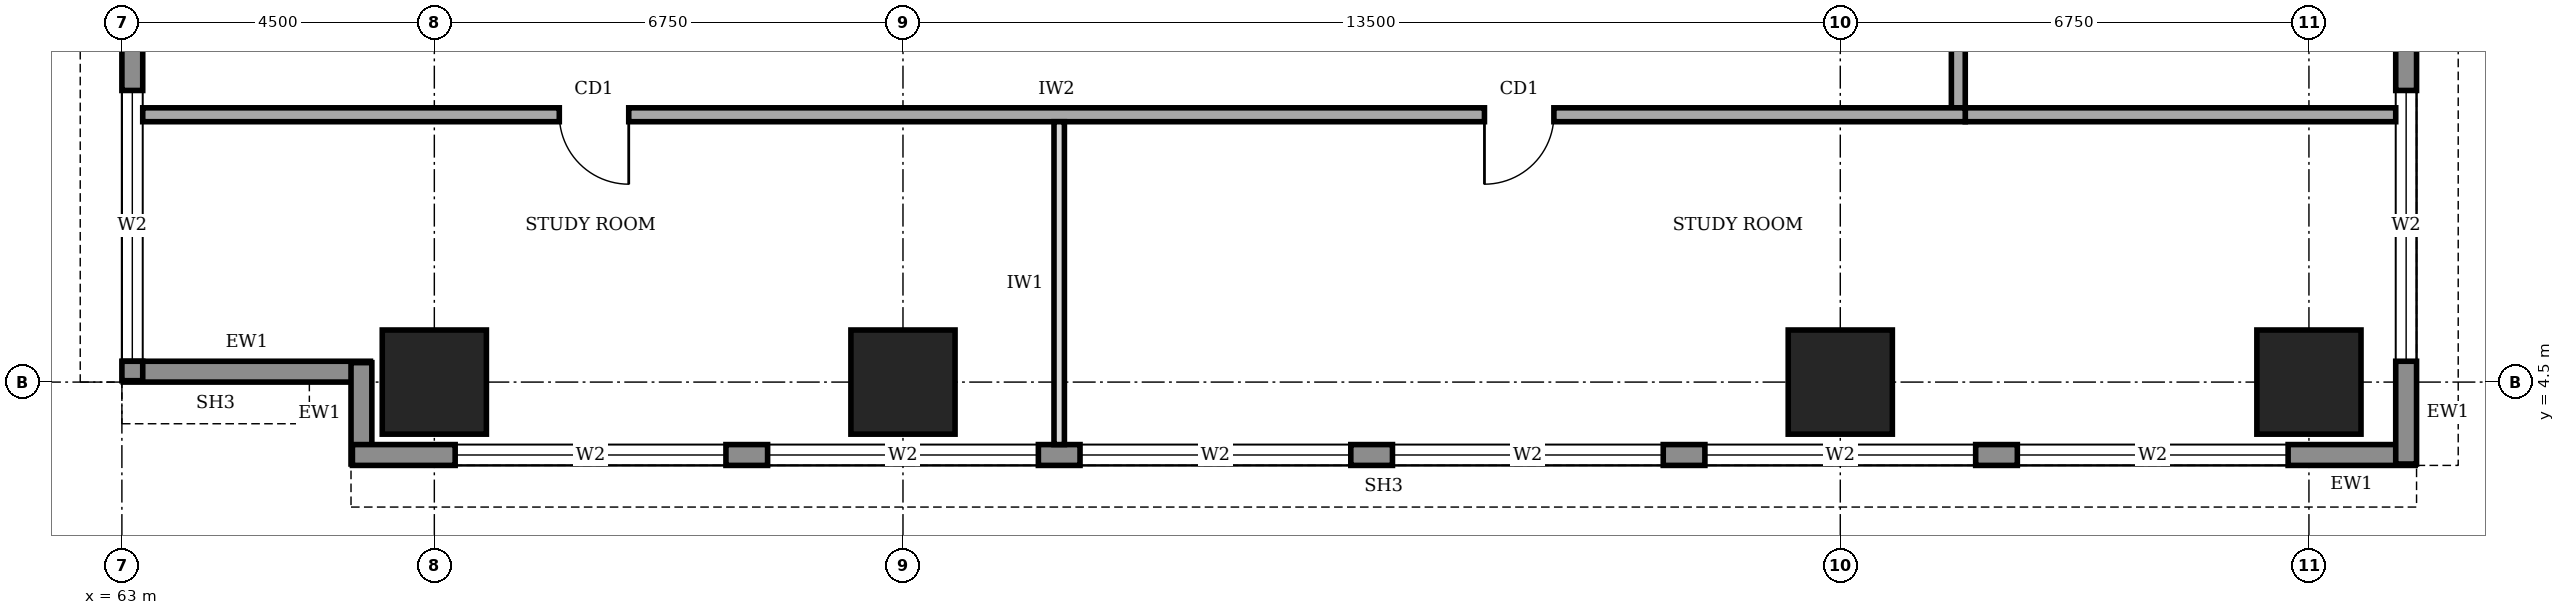
"""IFC4 building model, lengths in metres.
Left out: names, types, materials, properties, quantities, classifications, styles, units other than length and angle.
Written with IfcOpenShell. Run it as: python <this file> out.ifc"""

import sys

from ifc_helpers import new_model, si_unit, direction, frame, frame_2d, origin, origin_2d, place, context, subcontext, project, spatial, rectangle, extrude, element, fill, save


model = new_model("IFC4")
c1 = context("Model", 3, precision=1e-05, world=origin(), true_north=direction((0.0, 1.0)))
c2 = subcontext(c1, "Body", "Model", "MODEL_VIEW")
j1 = project(units=[si_unit("LENGTHUNIT", "METRE"), si_unit("PLANEANGLEUNIT", "RADIAN")], contexts=[c1])
p1 = place(None, origin())
s1 = spatial("IfcSite", under=j1, at=p1, CompositionType="ELEMENT")
p2 = place(p1, origin())
s2 = spatial("IfcBuilding", under=s1, at=p2, CompositionType="ELEMENT")
p3 = place(p2, frame((0.0, 0.0, 157.0)))
s3 = spatial("IfcBuildingStorey", under=s2, at=p3, CompositionType="ELEMENT", Elevation=157.0)
for number, where, z_axis, x_axis in (
    (1, (67.5, 4.5, 0.0), (0.0, 0.0, 1.0), (1.0, 0.0, 0.0)),
    (2, (74.25, 4.5, 0.0), (0.0, 0.0, 1.0), (1.0, 0.0, 0.0)),
    (3, (87.75, 4.5, 0.0), (0.0, 0.0, 1.0), (1.0, 0.0, 0.0)),
    (4, (94.5, 4.5, 0.0), (0.0, 0.0, 1.0), (1.0, 0.0, 0.0)),
):
    element("IfcColumn", number, at=place(p3, frame(where, z_axis=z_axis, x_axis=x_axis)), inside=s3, PredefinedType="COLUMN", context=c2, shape_type="SweptSolid", body=[
        extrude(rectangle(XDim=1.5, YDim=1.5, at=origin_2d()), origin(), (0.0, 0.0, 1.0), 4.0),
    ])
p4 = place(p3, frame((63.02, 4.65, 0.0), z_axis=(0.0, 0.0, 1.0), x_axis=(1.0, 0.0, 0.0)))
e5 = element("IfcWall", 5, at=p4, inside=s3, PredefinedType="STANDARD", context=c2, shape_type="SweptSolid", body=[
    extrude(rectangle(XDim=3.56, YDim=0.3, at=frame_2d((1.78, 0.0))), origin(), (0.0, 0.0, 1.0), 2.85),
])
p5 = place(p3, frame((66.45, 4.78, 0.0), z_axis=(0.0, 0.0, 1.0), x_axis=(0.0, -1.0, 0.0)))
e6 = element("IfcWall", 6, at=p5, inside=s3, PredefinedType="STANDARD", context=c2, shape_type="SweptSolid", body=[
    extrude(rectangle(XDim=1.46, YDim=0.3, at=frame_2d((0.73, 0.0))), origin(), (0.0, 0.0, 1.0), 3.75),
])
p6 = place(p3, frame((66.32, 3.45, 0.0), z_axis=(0.0, 0.0, 1.0), x_axis=(1.0, 0.0, 0.0)))
e7 = element("IfcWall", 7, at=p6, inside=s3, PredefinedType="STANDARD", context=c2, shape_type="SweptSolid", body=[
    extrude(rectangle(XDim=29.71, YDim=0.3, at=frame_2d((14.855, 0.0))), origin(), (0.0, 0.0, 1.0), 3.75),
])
p7 = place(p6, frame((1.48, 0.0, 0.6)))
e8 = element("IfcOpeningElement", 8, at=p7, cuts=e7, PredefinedType="OPENING", context=c2, shape_type="SweptSolid", body=[
    extrude(rectangle(XDim=3.9, YDim=2.6, at=frame_2d((1.95, 1.3))), frame((0.0, 0.16, 0.0), z_axis=(0.0, -1.0, 0.0), x_axis=(1.0, 0.0, 0.0)), (0.0, 0.0, 1.0), 0.32),
])
p8 = place(p6, frame((5.98, 0.0, 0.6)))
e9 = element("IfcOpeningElement", 9, at=p8, cuts=e7, PredefinedType="OPENING", context=c2, shape_type="SweptSolid", body=[
    extrude(rectangle(XDim=3.9, YDim=2.6, at=frame_2d((1.95, 1.3))), frame((0.0, 0.16, 0.0), z_axis=(0.0, -1.0, 0.0), x_axis=(1.0, 0.0, 0.0)), (0.0, 0.0, 1.0), 0.32),
])
p9 = place(p6, frame((10.48, 0.0, 0.6)))
e10 = element("IfcOpeningElement", 10, at=p9, cuts=e7, PredefinedType="OPENING", context=c2, shape_type="SweptSolid", body=[
    extrude(rectangle(XDim=3.9, YDim=2.6, at=frame_2d((1.95, 1.3))), frame((0.0, 0.16, 0.0), z_axis=(0.0, -1.0, 0.0), x_axis=(1.0, 0.0, 0.0)), (0.0, 0.0, 1.0), 0.32),
])
p10 = place(p6, frame((14.98, 0.0, 0.6)))
e11 = element("IfcOpeningElement", 11, at=p10, cuts=e7, PredefinedType="OPENING", context=c2, shape_type="SweptSolid", body=[
    extrude(rectangle(XDim=3.9, YDim=2.6, at=frame_2d((1.95, 1.3))), frame((0.0, 0.16, 0.0), z_axis=(0.0, -1.0, 0.0), x_axis=(1.0, 0.0, 0.0)), (0.0, 0.0, 1.0), 0.32),
])
p11 = place(p6, frame((19.48, 0.0, 0.6)))
e12 = element("IfcOpeningElement", 12, at=p11, cuts=e7, PredefinedType="OPENING", context=c2, shape_type="SweptSolid", body=[
    extrude(rectangle(XDim=3.9, YDim=2.6, at=frame_2d((1.95, 1.3))), frame((0.0, 0.16, 0.0), z_axis=(0.0, -1.0, 0.0), x_axis=(1.0, 0.0, 0.0)), (0.0, 0.0, 1.0), 0.32),
])
p12 = place(p6, frame((23.98, 0.0, 0.6)))
e13 = element("IfcOpeningElement", 13, at=p12, cuts=e7, PredefinedType="OPENING", context=c2, shape_type="SweptSolid", body=[
    extrude(rectangle(XDim=3.9, YDim=2.6, at=frame_2d((1.95, 1.3))), frame((0.0, 0.16, 0.0), z_axis=(0.0, -1.0, 0.0), x_axis=(1.0, 0.0, 0.0)), (0.0, 0.0, 1.0), 0.32),
])
p13 = place(p3, frame((95.9, 3.32, 0.0), z_axis=(0.0, 0.0, 1.0), x_axis=(0.0, 1.0, 0.0)))
e14 = element("IfcWall", 14, at=p13, inside=s3, PredefinedType="STANDARD", context=c2, shape_type="SweptSolid", body=[
    extrude(rectangle(XDim=33.86, YDim=0.3, at=frame_2d((16.93, 0.0))), origin(), (0.0, 0.0, 1.0), 3.75),
])
p14 = place(p13, frame((1.48, 0.0, 0.6)))
e15 = element("IfcOpeningElement", 15, at=p14, cuts=e14, PredefinedType="OPENING", context=c2, shape_type="SweptSolid", body=[
    extrude(rectangle(XDim=3.9, YDim=2.6, at=frame_2d((1.95, 1.3))), frame((0.0, 0.16, 0.0), z_axis=(0.0, -1.0, 0.0), x_axis=(1.0, 0.0, 0.0)), (0.0, 0.0, 1.0), 0.32),
])
p15 = place(p13, frame((5.98, 0.0, 0.6)))
e16 = element("IfcOpeningElement", 16, at=p15, cuts=e14, PredefinedType="OPENING", context=c2, shape_type="SweptSolid", body=[
    extrude(rectangle(XDim=3.9, YDim=2.6, at=frame_2d((1.95, 1.3))), frame((0.0, 0.16, 0.0), z_axis=(0.0, -1.0, 0.0), x_axis=(1.0, 0.0, 0.0)), (0.0, 0.0, 1.0), 0.32),
])
p16 = place(p13, frame((10.48, 0.0, 0.6)))
e17 = element("IfcOpeningElement", 17, at=p16, cuts=e14, PredefinedType="OPENING", context=c2, shape_type="SweptSolid", body=[
    extrude(rectangle(XDim=3.9, YDim=2.6, at=frame_2d((1.95, 1.3))), frame((0.0, 0.16, 0.0), z_axis=(0.0, -1.0, 0.0), x_axis=(1.0, 0.0, 0.0)), (0.0, 0.0, 1.0), 0.32),
])
p17 = place(p13, frame((14.98, 0.0, 0.6)))
e18 = element("IfcOpeningElement", 18, at=p17, cuts=e14, PredefinedType="OPENING", context=c2, shape_type="SweptSolid", body=[
    extrude(rectangle(XDim=3.9, YDim=2.6, at=frame_2d((1.95, 1.3))), frame((0.0, 0.16, 0.0), z_axis=(0.0, -1.0, 0.0), x_axis=(1.0, 0.0, 0.0)), (0.0, 0.0, 1.0), 0.32),
])
p18 = place(p13, frame((19.48, 0.0, 0.6)))
e19 = element("IfcOpeningElement", 19, at=p18, cuts=e14, PredefinedType="OPENING", context=c2, shape_type="SweptSolid", body=[
    extrude(rectangle(XDim=3.9, YDim=2.6, at=frame_2d((1.95, 1.3))), frame((0.0, 0.16, 0.0), z_axis=(0.0, -1.0, 0.0), x_axis=(1.0, 0.0, 0.0)), (0.0, 0.0, 1.0), 0.32),
])
p19 = place(p13, frame((23.98, 0.0, 0.6)))
e20 = element("IfcOpeningElement", 20, at=p19, cuts=e14, PredefinedType="OPENING", context=c2, shape_type="SweptSolid", body=[
    extrude(rectangle(XDim=3.9, YDim=2.6, at=frame_2d((1.95, 1.3))), frame((0.0, 0.16, 0.0), z_axis=(0.0, -1.0, 0.0), x_axis=(1.0, 0.0, 0.0)), (0.0, 0.0, 1.0), 0.32),
])
p20 = place(p13, frame((28.48, 0.0, 0.6)))
e21 = element("IfcOpeningElement", 21, at=p20, cuts=e14, PredefinedType="OPENING", context=c2, shape_type="SweptSolid", body=[
    extrude(rectangle(XDim=3.9, YDim=2.6, at=frame_2d((1.95, 1.3))), frame((0.0, 0.16, 0.0), z_axis=(0.0, -1.0, 0.0), x_axis=(1.0, 0.0, 0.0)), (0.0, 0.0, 1.0), 0.32),
])
p21 = place(p3, frame((63.15, 35.98, 0.0), z_axis=(0.0, 0.0, 1.0), x_axis=(0.0, -1.0, 0.0)))
e22 = element("IfcWall", 22, at=p21, inside=s3, PredefinedType="STANDARD", context=c2, shape_type="SweptSolid", body=[
    extrude(rectangle(XDim=31.46, YDim=0.3, at=frame_2d((15.73, 0.0))), origin(), (0.0, 0.0, 1.0), 3.75),
])
p22 = place(p21, frame((27.28, 0.0, 0.6)))
e23 = element("IfcOpeningElement", 23, at=p22, cuts=e22, PredefinedType="OPENING", context=c2, shape_type="SweptSolid", body=[
    extrude(rectangle(XDim=3.9, YDim=2.6, at=frame_2d((1.95, 1.3))), frame((0.0, 0.16, 0.0), z_axis=(0.0, -1.0, 0.0), x_axis=(1.0, 0.0, 0.0)), (0.0, 0.0, 1.0), 0.32),
])
p23 = place(p21, frame((22.78, 0.0, 0.6)))
e24 = element("IfcOpeningElement", 24, at=p23, cuts=e22, PredefinedType="OPENING", context=c2, shape_type="SweptSolid", body=[
    extrude(rectangle(XDim=3.9, YDim=2.6, at=frame_2d((1.95, 1.3))), frame((0.0, 0.16, 0.0), z_axis=(0.0, -1.0, 0.0), x_axis=(1.0, 0.0, 0.0)), (0.0, 0.0, 1.0), 0.32),
])
p24 = place(p21, frame((18.28, 0.0, 0.6)))
e25 = element("IfcOpeningElement", 25, at=p24, cuts=e22, PredefinedType="OPENING", context=c2, shape_type="SweptSolid", body=[
    extrude(rectangle(XDim=3.9, YDim=2.6, at=frame_2d((1.95, 1.3))), frame((0.0, 0.16, 0.0), z_axis=(0.0, -1.0, 0.0), x_axis=(1.0, 0.0, 0.0)), (0.0, 0.0, 1.0), 0.32),
])
p25 = place(p21, frame((13.78, 0.0, 0.6)))
e26 = element("IfcOpeningElement", 26, at=p25, cuts=e22, PredefinedType="OPENING", context=c2, shape_type="SweptSolid", body=[
    extrude(rectangle(XDim=3.9, YDim=2.6, at=frame_2d((1.95, 1.3))), frame((0.0, 0.16, 0.0), z_axis=(0.0, -1.0, 0.0), x_axis=(1.0, 0.0, 0.0)), (0.0, 0.0, 1.0), 0.32),
])
p26 = place(p21, frame((9.28, 0.0, 0.6)))
e27 = element("IfcOpeningElement", 27, at=p26, cuts=e22, PredefinedType="OPENING", context=c2, shape_type="SweptSolid", body=[
    extrude(rectangle(XDim=3.9, YDim=2.6, at=frame_2d((1.95, 1.3))), frame((0.0, 0.16, 0.0), z_axis=(0.0, -1.0, 0.0), x_axis=(1.0, 0.0, 0.0)), (0.0, 0.0, 1.0), 0.32),
])
p27 = place(p21, frame((4.78, 0.0, 0.6)))
e28 = element("IfcOpeningElement", 28, at=p27, cuts=e22, PredefinedType="OPENING", context=c2, shape_type="SweptSolid", body=[
    extrude(rectangle(XDim=3.9, YDim=2.6, at=frame_2d((1.95, 1.3))), frame((0.0, 0.16, 0.0), z_axis=(0.0, -1.0, 0.0), x_axis=(1.0, 0.0, 0.0)), (0.0, 0.0, 1.0), 0.32),
])
p28 = place(p3, frame((63.3, 8.35, 0.0), z_axis=(0.0, 0.0, 1.0), x_axis=(1.0, 0.0, 0.0)))
e29 = element("IfcWall", 29, at=p28, inside=s3, PredefinedType="SOLIDWALL", context=c2, shape_type="SweptSolid", body=[
    extrude(rectangle(XDim=26.25, YDim=0.2, at=frame_2d((13.125, 0.0))), origin(), (0.0, 0.0, 1.0), 3.75),
])
p29 = place(p28, frame((6.0, 0.0, 0.0)))
e30 = element("IfcOpeningElement", 30, at=p29, cuts=e29, PredefinedType="OPENING", context=c2, shape_type="SweptSolid", body=[
    extrude(rectangle(XDim=1.0, YDim=2.1, at=frame_2d((0.5, 1.05))), frame((0.0, 0.11, 0.0), z_axis=(0.0, -1.0, 0.0), x_axis=(1.0, 0.0, 0.0)), (0.0, 0.0, 1.0), 0.22),
])
p30 = place(p28, frame((19.325, 0.0, 0.0)))
e31 = element("IfcOpeningElement", 31, at=p30, cuts=e29, PredefinedType="OPENING", context=c2, shape_type="SweptSolid", body=[
    extrude(rectangle(XDim=1.0, YDim=2.1, at=frame_2d((0.5, 1.05))), frame((0.0, 0.11, 0.0), z_axis=(0.0, -1.0, 0.0), x_axis=(1.0, 0.0, 0.0)), (0.0, 0.0, 1.0), 0.22),
])
p31 = place(p3, frame((89.45, 8.45, 0.0), z_axis=(0.0, 0.0, 1.0), x_axis=(0.0, 1.0, 0.0)))
e32 = element("IfcWall", 32, at=p31, inside=s3, PredefinedType="SOLIDWALL", context=c2, shape_type="SweptSolid", body=[
    extrude(rectangle(XDim=23.8, YDim=0.2, at=frame_2d((11.9, 0.0))), origin(), (0.0, 0.0, 1.0), 3.75),
])
p32 = place(p31, frame((1.925, 0.0, 0.0)))
e33 = element("IfcOpeningElement", 33, at=p32, cuts=e32, PredefinedType="OPENING", context=c2, shape_type="SweptSolid", body=[
    extrude(rectangle(XDim=1.0, YDim=2.1, at=frame_2d((0.5, 1.05))), frame((0.0, 0.11, 0.0), z_axis=(0.0, -1.0, 0.0), x_axis=(1.0, 0.0, 0.0)), (0.0, 0.0, 1.0), 0.22),
])
p33 = place(p31, frame((6.5, 0.0, 0.0)))
e34 = element("IfcOpeningElement", 34, at=p33, cuts=e32, PredefinedType="OPENING", context=c2, shape_type="SweptSolid", body=[
    extrude(rectangle(XDim=0.9, YDim=2.1, at=frame_2d((0.45, 1.05))), frame((0.0, 0.11, 0.0), z_axis=(0.0, -1.0, 0.0), x_axis=(1.0, 0.0, 0.0)), (0.0, 0.0, 1.0), 0.22),
])
p34 = place(p31, frame((9.5, 0.0, 0.0)))
e35 = element("IfcOpeningElement", 35, at=p34, cuts=e32, PredefinedType="OPENING", context=c2, shape_type="SweptSolid", body=[
    extrude(rectangle(XDim=0.9, YDim=2.1, at=frame_2d((0.45, 1.05))), frame((0.0, 0.11, 0.0), z_axis=(0.0, -1.0, 0.0), x_axis=(1.0, 0.0, 0.0)), (0.0, 0.0, 1.0), 0.22),
])
p35 = place(p31, frame((14.35, 0.0, 0.0)))
e36 = element("IfcOpeningElement", 36, at=p35, cuts=e32, PredefinedType="OPENING", context=c2, shape_type="SweptSolid", body=[
    extrude(rectangle(XDim=0.9, YDim=2.1, at=frame_2d((0.45, 1.05))), frame((0.0, 0.11, 0.0), z_axis=(0.0, -1.0, 0.0), x_axis=(1.0, 0.0, 0.0)), (0.0, 0.0, 1.0), 0.22),
])
p36 = place(p31, frame((17.05, 0.0, 0.0)))
e37 = element("IfcOpeningElement", 37, at=p36, cuts=e32, PredefinedType="OPENING", context=c2, shape_type="SweptSolid", body=[
    extrude(rectangle(XDim=1.0, YDim=2.1, at=frame_2d((0.5, 1.05))), frame((0.0, 0.11, 0.0), z_axis=(0.0, -1.0, 0.0), x_axis=(1.0, 0.0, 0.0)), (0.0, 0.0, 1.0), 0.22),
])
p37 = place(p31, frame((11.55, 0.0, 0.0)))
e38 = element("IfcOpeningElement", 38, at=p37, cuts=e32, PredefinedType="OPENING", context=c2, shape_type="SweptSolid", body=[
    extrude(rectangle(XDim=1.0, YDim=2.1, at=frame_2d((0.5, 1.05))), frame((0.0, 0.11, 0.0), z_axis=(0.0, -1.0, 0.0), x_axis=(1.0, 0.0, 0.0)), (0.0, 0.0, 1.0), 0.22),
])
p38 = place(p31, frame((20.675, 0.0, 0.0)))
e39 = element("IfcOpeningElement", 39, at=p38, cuts=e32, PredefinedType="OPENING", context=c2, shape_type="SweptSolid", body=[
    extrude(rectangle(XDim=1.0, YDim=2.1, at=frame_2d((0.5, 1.05))), frame((0.0, 0.11, 0.0), z_axis=(0.0, -1.0, 0.0), x_axis=(1.0, 0.0, 0.0)), (0.0, 0.0, 1.0), 0.22),
])
p39 = place(p3, frame((89.55, 8.35, 0.0), z_axis=(0.0, 0.0, 1.0), x_axis=(1.0, 0.0, 0.0)))
e40 = element("IfcWall", 40, at=p39, inside=s3, PredefinedType="SOLIDWALL", context=c2, shape_type="SweptSolid", body=[
    extrude(rectangle(XDim=6.2, YDim=0.2, at=frame_2d((3.1, 0.0))), origin(), (0.0, 0.0, 1.0), 3.75),
])
p40 = place(p3, frame((76.5, 3.6, 0.0), z_axis=(0.0, 0.0, 1.0), x_axis=(0.0, 1.0, 0.0)))
e41 = element("IfcWall", 41, at=p40, inside=s3, PredefinedType="PARTITIONING", context=c2, shape_type="SweptSolid", body=[
    extrude(rectangle(XDim=4.65, YDim=0.15, at=frame_2d((2.325, 0.0))), origin(), (0.0, 0.0, 1.0), 3.75),
])
p41 = place(p7, origin())
e42 = element("IfcWindow", 42, at=p41, inside=s3, PartitioningType="SINGLE_PANEL", PredefinedType="WINDOW", context=c2, shape_type="SweptSolid", body=[
    extrude(rectangle(XDim=3.9, YDim=2.6, at=frame_2d((1.95, 1.3))), frame((0.0, 0.03, 0.0), z_axis=(0.0, -1.0, 0.0), x_axis=(1.0, 0.0, 0.0)), (0.0, 0.0, 1.0), 0.06),
])
fill(e8, e42)
p42 = place(p8, origin())
e43 = element("IfcWindow", 43, at=p42, inside=s3, PartitioningType="SINGLE_PANEL", PredefinedType="WINDOW", context=c2, shape_type="SweptSolid", body=[
    extrude(rectangle(XDim=3.9, YDim=2.6, at=frame_2d((1.95, 1.3))), frame((0.0, 0.03, 0.0), z_axis=(0.0, -1.0, 0.0), x_axis=(1.0, 0.0, 0.0)), (0.0, 0.0, 1.0), 0.06),
])
fill(e9, e43)
p43 = place(p9, origin())
e44 = element("IfcWindow", 44, at=p43, inside=s3, PartitioningType="SINGLE_PANEL", PredefinedType="WINDOW", context=c2, shape_type="SweptSolid", body=[
    extrude(rectangle(XDim=3.9, YDim=2.6, at=frame_2d((1.95, 1.3))), frame((0.0, 0.03, 0.0), z_axis=(0.0, -1.0, 0.0), x_axis=(1.0, 0.0, 0.0)), (0.0, 0.0, 1.0), 0.06),
])
fill(e10, e44)
p44 = place(p10, origin())
e45 = element("IfcWindow", 45, at=p44, inside=s3, PartitioningType="SINGLE_PANEL", PredefinedType="WINDOW", context=c2, shape_type="SweptSolid", body=[
    extrude(rectangle(XDim=3.9, YDim=2.6, at=frame_2d((1.95, 1.3))), frame((0.0, 0.03, 0.0), z_axis=(0.0, -1.0, 0.0), x_axis=(1.0, 0.0, 0.0)), (0.0, 0.0, 1.0), 0.06),
])
fill(e11, e45)
p45 = place(p11, origin())
e46 = element("IfcWindow", 46, at=p45, inside=s3, PartitioningType="SINGLE_PANEL", PredefinedType="WINDOW", context=c2, shape_type="SweptSolid", body=[
    extrude(rectangle(XDim=3.9, YDim=2.6, at=frame_2d((1.95, 1.3))), frame((0.0, 0.03, 0.0), z_axis=(0.0, -1.0, 0.0), x_axis=(1.0, 0.0, 0.0)), (0.0, 0.0, 1.0), 0.06),
])
fill(e12, e46)
p46 = place(p12, origin())
e47 = element("IfcWindow", 47, at=p46, inside=s3, PartitioningType="SINGLE_PANEL", PredefinedType="WINDOW", context=c2, shape_type="SweptSolid", body=[
    extrude(rectangle(XDim=3.9, YDim=2.6, at=frame_2d((1.95, 1.3))), frame((0.0, 0.03, 0.0), z_axis=(0.0, -1.0, 0.0), x_axis=(1.0, 0.0, 0.0)), (0.0, 0.0, 1.0), 0.06),
])
fill(e13, e47)
p47 = place(p14, origin())
e48 = element("IfcWindow", 48, at=p47, inside=s3, PartitioningType="SINGLE_PANEL", PredefinedType="WINDOW", context=c2, shape_type="SweptSolid", body=[
    extrude(rectangle(XDim=3.9, YDim=2.6, at=frame_2d((1.95, 1.3))), frame((0.0, 0.03, 0.0), z_axis=(0.0, -1.0, 0.0), x_axis=(1.0, 0.0, 0.0)), (0.0, 0.0, 1.0), 0.06),
])
fill(e15, e48)
p48 = place(p22, origin())
e49 = element("IfcWindow", 49, at=p48, inside=s3, PartitioningType="SINGLE_PANEL", PredefinedType="WINDOW", context=c2, shape_type="SweptSolid", body=[
    extrude(rectangle(XDim=3.9, YDim=2.6, at=frame_2d((1.95, 1.3))), frame((0.0, 0.03, 0.0), z_axis=(0.0, -1.0, 0.0), x_axis=(1.0, 0.0, 0.0)), (0.0, 0.0, 1.0), 0.06),
])
fill(e23, e49)
p49 = place(p29, frame((1.0, 0.0, 0.0), z_axis=(0.0, 0.0, 1.0), x_axis=(-1.0, 0.0, 0.0)))
e50 = element("IfcDoor", 50, at=p49, inside=s3, OperationType="SINGLE_SWING_LEFT", PredefinedType="DOOR", context=c2, shape_type="SweptSolid", body=[
    extrude(rectangle(XDim=1.0, YDim=2.1, at=frame_2d((0.5, 1.05))), frame((0.0, 0.025, 0.0), z_axis=(0.0, -1.0, 0.0), x_axis=(1.0, 0.0, 0.0)), (0.0, 0.0, 1.0), 0.05),
])
fill(e30, e50)
p50 = place(p30, frame((1.0, 0.0, 0.0), z_axis=(0.0, 0.0, 1.0), x_axis=(-1.0, 0.0, 0.0)))
e51 = element("IfcDoor", 51, at=p50, inside=s3, OperationType="SINGLE_SWING_RIGHT", PredefinedType="DOOR", context=c2, shape_type="SweptSolid", body=[
    extrude(rectangle(XDim=1.0, YDim=2.1, at=frame_2d((0.5, 1.05))), frame((0.0, 0.025, 0.0), z_axis=(0.0, -1.0, 0.0), x_axis=(1.0, 0.0, 0.0)), (0.0, 0.0, 1.0), 0.05),
])
fill(e31, e51)
save(model, sys.argv[1])
